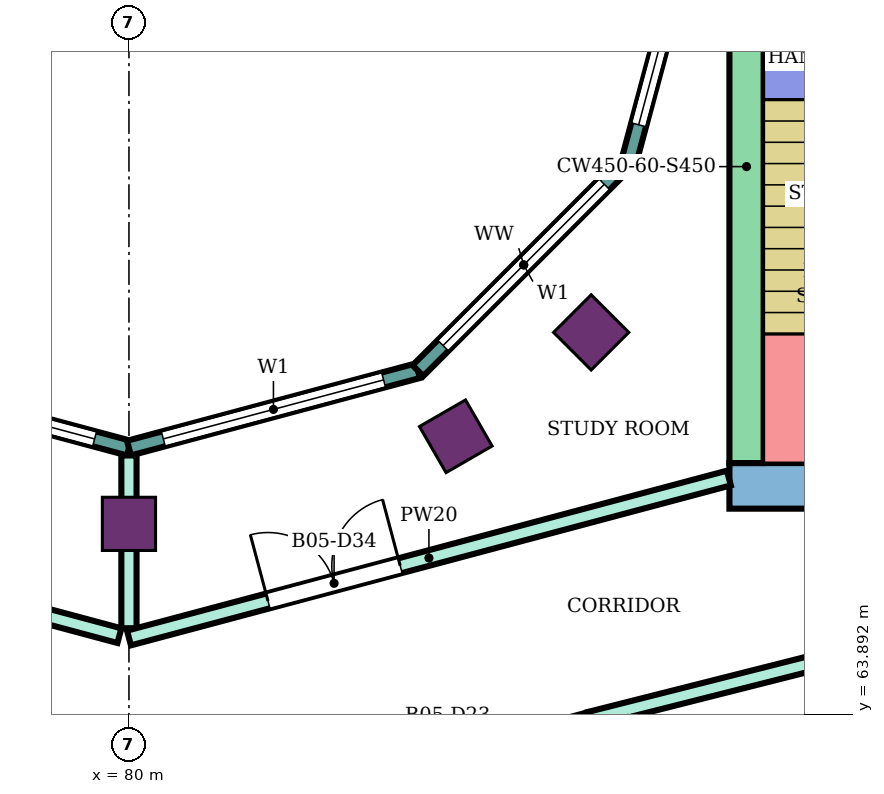
"""IFC4 building model, lengths in metres.
Left out: names, types, materials, properties, quantities, classifications, styles, units other than length and angle.
Written with IfcOpenShell. Run it as: python <this file> out.ifc"""

import sys

from ifc_helpers import new_model, si_unit, direction, frame, frame_2d, origin, origin_2d, place, context, subcontext, project, spatial, rectangle, extrude, element, fill, save


model = new_model("IFC4")
c1 = context("Model", 3, precision=1e-05, world=origin(), true_north=direction((0.0, 1.0)))
c2 = subcontext(c1, "Body", "Model", "MODEL_VIEW")
j1 = project(units=[si_unit("LENGTHUNIT", "METRE"), si_unit("PLANEANGLEUNIT", "RADIAN")], contexts=[c1])
p1 = place(None, origin())
s1 = spatial("IfcSite", under=j1, at=p1, CompositionType="ELEMENT")
p2 = place(p1, origin())
s2 = spatial("IfcBuilding", under=s1, at=p2, CompositionType="ELEMENT")
p3 = place(p2, frame((0.0, 0.0, 266.7)))
s3 = spatial("IfcBuildingStorey", under=s2, at=p3, CompositionType="ELEMENT", Elevation=266.7)
for number, where, z_axis, x_axis in (
    (1, (80.0, 66.4, 0.0), (0.0, 0.0, 1.0), (0.0, -1.0, 0.0)),
    (2, (84.3, 67.552, 0.0), (0.0, 0.0, 1.0), (0.5, -0.866, 0.0)),
    (3, (86.081, 68.919, 0.0), (0.0, 0.0, 1.0), (0.707, -0.707, 0.0)),
):
    element("IfcColumn", number, at=place(p3, frame(where, z_axis=z_axis, x_axis=x_axis)), inside=s3, PredefinedType="COLUMN", context=c2, shape_type="SweptSolid", body=[
        extrude(rectangle(XDim=0.7, YDim=0.7, at=origin_2d()), origin(), (0.0, 0.0, 1.0), 4.2),
    ])
p4 = place(p3, frame((87.9, 66.9, 0.0), z_axis=(0.0, 0.0, 1.0), x_axis=(1.0, 0.0, 0.0)))
e4 = element("IfcWall", 4, at=p4, inside=s3, PredefinedType="SHEAR", context=c2, shape_type="SweptSolid", body=[
    extrude(rectangle(XDim=14.9, YDim=0.6, at=frame_2d((7.45, 0.0))), origin(), (0.0, 0.0, 1.0), 3.75),
])
p5 = place(p4, frame((4.2, 0.0, 0.0)))
e5 = element("IfcOpeningElement", 5, at=p5, cuts=e4, PredefinedType="OPENING", context=c2, shape_type="SweptSolid", body=[
    extrude(rectangle(XDim=2.4, YDim=2.4, at=frame_2d((1.2, 1.2))), frame((0.0, 0.31, 0.0), z_axis=(0.0, -1.0, 0.0), x_axis=(1.0, 0.0, 0.0)), (0.0, 0.0, 1.0), 0.62),
])
p6 = place(p3, frame((88.125, 67.2, 0.0), z_axis=(0.0, 0.0, 1.0), x_axis=(0.0, 1.0, 0.0)))
e6 = element("IfcWall", 6, at=p6, inside=s3, PredefinedType="SHEAR", context=c2, shape_type="SweptSolid", body=[
    extrude(rectangle(XDim=7.8, YDim=0.45, at=frame_2d((3.9, 0.0))), origin(), (0.0, 0.0, 1.0), 3.75),
])
p7 = place(p3, frame((76.198, 68.415, 0.0), z_axis=(0.0, 0.0, 1.0), x_axis=(0.965933654434, -0.258789828301, 0.0)))
e7 = element("IfcWall", 7, at=p7, inside=s3, PredefinedType="NOTDEFINED", context=c2, shape_type="SweptSolid", body=[
    extrude(rectangle(XDim=3.936, YDim=0.2, at=frame_2d((1.968, 0.0))), origin(), (0.0, 0.0, 1.0), 4.2),
])
p8 = place(p7, frame((0.468, 0.0, 0.9)))
e8 = element("IfcOpeningElement", 8, at=p8, cuts=e7, PredefinedType="OPENING", context=c2, shape_type="SweptSolid", body=[
    extrude(rectangle(XDim=3.0, YDim=2.3, at=frame_2d((1.5, 1.15))), frame((0.0, 0.11, 0.0), z_axis=(0.0, -1.0, 0.0), x_axis=(1.0, 0.0, 0.0)), (0.0, 0.0, 1.0), 0.22),
])
p9 = place(p3, frame((80.0, 67.396, 0.0), z_axis=(0.0, 0.0, 1.0), x_axis=(0.965933654434, 0.258789828301, 0.0)))
e9 = element("IfcWall", 9, at=p9, inside=s3, PredefinedType="NOTDEFINED", context=c2, shape_type="SweptSolid", body=[
    extrude(rectangle(XDim=3.936, YDim=0.2, at=frame_2d((1.968, 0.0))), origin(), (0.0, 0.0, 1.0), 4.2),
])
p10 = place(p9, frame((0.468, 0.0, 0.9)))
e10 = element("IfcOpeningElement", 10, at=p10, cuts=e9, PredefinedType="OPENING", context=c2, shape_type="SweptSolid", body=[
    extrude(rectangle(XDim=3.0, YDim=2.3, at=frame_2d((1.5, 1.15))), frame((0.0, 0.11, 0.0), z_axis=(0.0, -1.0, 0.0), x_axis=(1.0, 0.0, 0.0)), (0.0, 0.0, 1.0), 0.22),
])
p11 = place(p3, frame((83.802, 68.415, 0.0), z_axis=(0.0, 0.0, 1.0), x_axis=(0.707106781187, 0.707106781187, 0.0)))
e11 = element("IfcWall", 11, at=p11, inside=s3, PredefinedType="NOTDEFINED", context=c2, shape_type="SweptSolid", body=[
    extrude(rectangle(XDim=3.936, YDim=0.2, at=frame_2d((1.968, 0.0))), origin(), (0.0, 0.0, 1.0), 4.2),
])
p12 = place(p11, frame((0.468, 0.0, 0.9)))
e12 = element("IfcOpeningElement", 12, at=p12, cuts=e11, PredefinedType="OPENING", context=c2, shape_type="SweptSolid", body=[
    extrude(rectangle(XDim=3.0, YDim=2.3, at=frame_2d((1.5, 1.15))), frame((0.0, 0.11, 0.0), z_axis=(0.0, -1.0, 0.0), x_axis=(1.0, 0.0, 0.0)), (0.0, 0.0, 1.0), 0.22),
])
p13 = place(p3, frame((86.585, 71.198, 0.0), z_axis=(0.0, 0.0, 1.0), x_axis=(0.258789828301, 0.965933654434, 0.0)))
e13 = element("IfcWall", 13, at=p13, inside=s3, PredefinedType="NOTDEFINED", context=c2, shape_type="SweptSolid", body=[
    extrude(rectangle(XDim=3.936, YDim=0.2, at=frame_2d((1.968, 0.0))), origin(), (0.0, 0.0, 1.0), 4.2),
])
p14 = place(p13, frame((0.468, 0.0, 0.9)))
e14 = element("IfcOpeningElement", 14, at=p14, cuts=e13, PredefinedType="OPENING", context=c2, shape_type="SweptSolid", body=[
    extrude(rectangle(XDim=3.0, YDim=2.3, at=frame_2d((1.5, 1.15))), frame((0.0, 0.11, 0.0), z_axis=(0.0, -1.0, 0.0), x_axis=(1.0, 0.0, 0.0)), (0.0, 0.0, 1.0), 0.22),
])
p15 = place(p3, frame((73.947, 63.826, 0.0), z_axis=(0.0, 0.0, 1.0), x_axis=(0.965856500469, -0.259077634122, 0.0)))
e15 = element("IfcWall", 15, at=p15, inside=s3, PredefinedType="PARTITIONING", context=c2, shape_type="SweptSolid", body=[
    extrude(rectangle(XDim=6.217, YDim=0.2, at=frame_2d((3.108, 0.0))), origin(), (0.0, 0.0, 1.0), 3.75),
])
p16 = place(p3, frame((74.603, 66.342, 0.0), z_axis=(0.0, 0.0, 1.0), x_axis=(0.965920893652, -0.258837453254, 0.0)))
e16 = element("IfcWall", 16, at=p16, inside=s3, PredefinedType="PARTITIONING", context=c2, shape_type="SweptSolid", body=[
    extrude(rectangle(XDim=5.458, YDim=0.2, at=frame_2d((2.729, 0.0))), origin(), (0.0, 0.0, 1.0), 3.75),
])
p17 = place(p16, frame((2.512, 0.0, 0.0)))
e17 = element("IfcOpeningElement", 17, at=p17, cuts=e16, PredefinedType="OPENING", context=c2, shape_type="SweptSolid", body=[
    extrude(rectangle(XDim=0.9, YDim=2.1, at=frame_2d((0.45, 1.05))), frame((0.0, 0.11, 0.0), z_axis=(0.0, -1.0, 0.0), x_axis=(1.0, 0.0, 0.0)), (0.0, 0.0, 1.0), 0.22),
])
p18 = place(p3, frame((80.048, 62.217, 0.0), z_axis=(0.0, 0.0, 1.0), x_axis=(0.966097920642, 0.258175923996, 0.0)))
e18 = element("IfcWall", 18, at=p18, inside=s3, PredefinedType="PARTITIONING", context=c2, shape_type="SweptSolid", body=[
    extrude(rectangle(XDim=6.217, YDim=0.2, at=frame_2d((3.108, 0.0))), origin(), (0.0, 0.0, 1.0), 3.75),
])
p19 = place(p18, frame((3.792, 0.0, 0.0)))
e19 = element("IfcOpeningElement", 19, at=p19, cuts=e18, PredefinedType="OPENING", context=c2, shape_type="SweptSolid", body=[
    extrude(rectangle(XDim=1.0, YDim=2.1, at=frame_2d((0.5, 1.05))), frame((0.0, 0.11, 0.0), z_axis=(0.0, -1.0, 0.0), x_axis=(1.0, 0.0, 0.0)), (0.0, 0.0, 1.0), 0.22),
])
p20 = place(p3, frame((80.0, 65.027, 0.0), z_axis=(0.0, 0.0, 1.0), x_axis=(0.0, 1.0, 0.0)))
e20 = element("IfcWall", 20, at=p20, inside=s3, PredefinedType="PARTITIONING", context=c2, shape_type="SweptSolid", body=[
    extrude(rectangle(XDim=2.273, YDim=0.2, at=frame_2d((1.136, 0.0))), origin(), (0.0, 0.0, 1.0), 3.75),
])
p21 = place(p3, frame((80.0, 64.898, 0.0), z_axis=(0.0, 0.0, 1.0), x_axis=(0.966236923997, 0.25765520896, 0.0)))
e21 = element("IfcWall", 21, at=p21, inside=s3, PredefinedType="PARTITIONING", context=c2, shape_type="SweptSolid", body=[
    extrude(rectangle(XDim=8.168, YDim=0.2, at=frame_2d((4.084, 0.0))), origin(), (0.0, 0.0, 1.0), 3.75),
])
p22 = place(p21, frame((1.893, 0.0, 0.0)))
e22 = element("IfcOpeningElement", 22, at=p22, cuts=e21, PredefinedType="OPENING", context=c2, shape_type="SweptSolid", body=[
    extrude(rectangle(XDim=1.8, YDim=2.1, at=frame_2d((0.9, 1.05))), frame((0.0, 0.11, 0.0), z_axis=(0.0, -1.0, 0.0), x_axis=(1.0, 0.0, 0.0)), (0.0, 0.0, 1.0), 0.22),
])
p23 = place(p3, frame((86.053, 63.826, 0.0), z_axis=(0.0, 0.0, 1.0), x_axis=(0.969490004987, 0.245130843083, 0.0)))
e23 = element("IfcWall", 23, at=p23, inside=s3, PredefinedType="PARTITIONING", context=c2, shape_type="SweptSolid", body=[
    extrude(rectangle(XDim=5.908, YDim=0.2, at=frame_2d((2.954, 0.0))), origin(), (0.0, 0.0, 1.0), 3.75),
])
p24 = place(p8, origin())
e24 = element("IfcWindow", 24, at=p24, inside=s3, PartitioningType="SINGLE_PANEL", PredefinedType="WINDOW", context=c2, shape_type="SweptSolid", body=[
    extrude(rectangle(XDim=3.0, YDim=2.3, at=frame_2d((1.5, 1.15))), frame((0.0, 0.03, 0.0), z_axis=(0.0, -1.0, 0.0), x_axis=(1.0, 0.0, 0.0)), (0.0, 0.0, 1.0), 0.06),
])
fill(e8, e24)
p25 = place(p10, origin())
e25 = element("IfcWindow", 25, at=p25, inside=s3, PartitioningType="SINGLE_PANEL", PredefinedType="WINDOW", context=c2, shape_type="SweptSolid", body=[
    extrude(rectangle(XDim=3.0, YDim=2.3, at=frame_2d((1.5, 1.15))), frame((0.0, 0.03, 0.0), z_axis=(0.0, -1.0, 0.0), x_axis=(1.0, 0.0, 0.0)), (0.0, 0.0, 1.0), 0.06),
])
fill(e10, e25)
p26 = place(p12, origin())
e26 = element("IfcWindow", 26, at=p26, inside=s3, PartitioningType="SINGLE_PANEL", PredefinedType="WINDOW", context=c2, shape_type="SweptSolid", body=[
    extrude(rectangle(XDim=3.0, YDim=2.3, at=frame_2d((1.5, 1.15))), frame((0.0, 0.03, 0.0), z_axis=(0.0, -1.0, 0.0), x_axis=(1.0, 0.0, 0.0)), (0.0, 0.0, 1.0), 0.06),
])
fill(e12, e26)
p27 = place(p14, origin())
e27 = element("IfcWindow", 27, at=p27, inside=s3, PartitioningType="SINGLE_PANEL", PredefinedType="WINDOW", context=c2, shape_type="SweptSolid", body=[
    extrude(rectangle(XDim=3.0, YDim=2.3, at=frame_2d((1.5, 1.15))), frame((0.0, 0.03, 0.0), z_axis=(0.0, -1.0, 0.0), x_axis=(1.0, 0.0, 0.0)), (0.0, 0.0, 1.0), 0.06),
])
fill(e14, e27)
p28 = place(p22, origin())
e28 = element("IfcDoor", 28, at=p28, inside=s3, OperationType="DOUBLE_DOOR_SINGLE_SWING", PredefinedType="DOOR", context=c2, shape_type="SweptSolid", body=[
    extrude(rectangle(XDim=1.8, YDim=2.1, at=frame_2d((0.9, 1.05))), frame((0.0, 0.025, 0.0), z_axis=(0.0, -1.0, 0.0), x_axis=(1.0, 0.0, 0.0)), (0.0, 0.0, 1.0), 0.05),
])
fill(e22, e28)
save(model, sys.argv[1])
